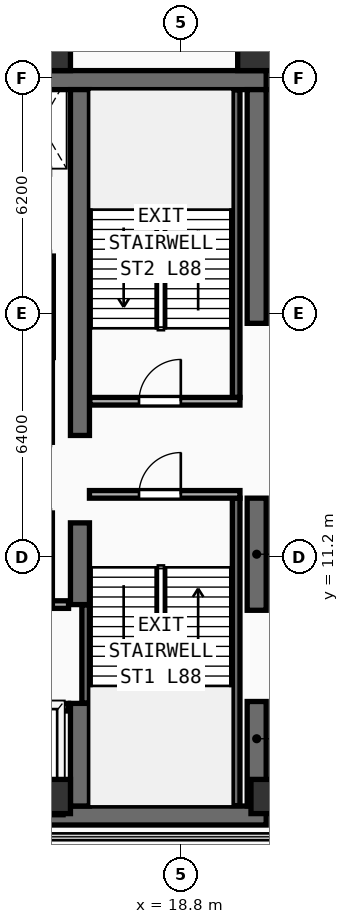
"""IFC4 building model, lengths in metres.
Left out: names, types, materials, properties, quantities, classifications, styles, units other than length and angle.
Written with IfcOpenShell. Run it as: python <this file> out.ifc"""

import sys

from ifc_helpers import new_model, si_unit, direction, frame, frame_2d, origin, origin_2d, place, context, subcontext, project, spatial, rectangle, extrude, element, fill, save


model = new_model("IFC4")
c1 = context("Model", 3, precision=1e-05, world=origin(), true_north=direction((0.0, 1.0)))
c2 = subcontext(c1, "Body", "Model", "MODEL_VIEW")
j1 = project(units=[si_unit("LENGTHUNIT", "METRE"), si_unit("PLANEANGLEUNIT", "RADIAN")], contexts=[c1])
p1 = place(None, origin())
s1 = spatial("IfcSite", under=j1, at=p1, CompositionType="ELEMENT")
p2 = place(p1, origin())
s2 = spatial("IfcBuilding", under=s1, at=p2, CompositionType="ELEMENT")
p3 = place(p2, frame((0.0, 0.0, 344.2)))
s3 = spatial("IfcBuildingStorey", under=s2, at=p3, CompositionType="ELEMENT", Elevation=344.2)
for number, where, z_axis, x_axis in (
    (1, (7.2, 4.4, 0.0), (0.0, 0.0, 1.0), (1.0, 0.0, 0.0)),
    (2, (7.2, 23.75, 0.0), (0.0, 0.0, 1.0), (1.0, 0.0, 0.0)),
):
    element("IfcWall", number, at=place(p3, frame(where, z_axis=z_axis, x_axis=x_axis)), inside=s3, PredefinedType="SHEAR", context=c2, shape_type="SweptSolid", body=[
        extrude(rectangle(XDim=13.85, YDim=0.5, at=frame_2d((6.925, 0.0))), origin(), (0.0, 0.0, 1.0), 3.66),
    ])
p4 = place(p3, frame((20.8, 4.65, 0.0), z_axis=(0.0, 0.0, 1.0), x_axis=(0.0, 1.0, 0.0)))
e3 = element("IfcWall", 3, at=p4, inside=s3, PredefinedType="SHEAR", context=c2, shape_type="SweptSolid", body=[
    extrude(rectangle(XDim=2.75, YDim=0.5, at=frame_2d((1.375, 0.0))), origin(), (0.0, 0.0, 1.0), 3.66),
])
p5 = place(p3, frame((20.8, 9.8, 0.0), z_axis=(0.0, 0.0, 1.0), x_axis=(0.0, 1.0, 0.0)))
e4 = element("IfcWall", 4, at=p5, inside=s3, PredefinedType="SHEAR", context=c2, shape_type="SweptSolid", body=[
    extrude(rectangle(XDim=2.95, YDim=0.5, at=frame_2d((1.475, 0.0))), origin(), (0.0, 0.0, 1.0), 3.66),
])
p6 = place(p3, frame((20.8, 17.35, 0.0), z_axis=(0.0, 0.0, 1.0), x_axis=(0.0, 1.0, 0.0)))
e5 = element("IfcWall", 5, at=p6, inside=s3, PredefinedType="SHEAR", context=c2, shape_type="SweptSolid", body=[
    extrude(rectangle(XDim=6.15, YDim=0.5, at=frame_2d((3.075, 0.0))), origin(), (0.0, 0.0, 1.0), 3.66),
])
p7 = place(p3, frame((16.15, 4.65, 0.0), z_axis=(0.0, 0.0, 1.0), x_axis=(0.0, 1.0, 0.0)))
e6 = element("IfcWall", 6, at=p7, inside=s3, PredefinedType="SHEAR", context=c2, shape_type="SweptSolid", body=[
    extrude(rectangle(XDim=2.7, YDim=0.5, at=frame_2d((1.35, 0.0))), origin(), (0.0, 0.0, 1.0), 3.66),
])
p8 = place(p3, frame((16.15, 9.95, 0.0), z_axis=(0.0, 0.0, 1.0), x_axis=(0.0, 1.0, 0.0)))
e7 = element("IfcWall", 7, at=p8, inside=s3, PredefinedType="SHEAR", context=c2, shape_type="SweptSolid", body=[
    extrude(rectangle(XDim=2.15, YDim=0.5, at=frame_2d((1.075, 0.0))), origin(), (0.0, 0.0, 1.0), 3.66),
])
p9 = place(p3, frame((16.15, 14.4, 0.0), z_axis=(0.0, 0.0, 1.0), x_axis=(0.0, 1.0, 0.0)))
e8 = element("IfcWall", 8, at=p9, inside=s3, PredefinedType="SHEAR", context=c2, shape_type="SweptSolid", body=[
    extrude(rectangle(XDim=9.1, YDim=0.5, at=frame_2d((4.55, 0.0))), origin(), (0.0, 0.0, 1.0), 3.66),
])
for number, where, z_axis, x_axis in (
    (9, (15.45, 4.9, 0.0), (0.0, 0.0, 1.0), (1.0, 0.0, 0.0)),
    (10, (21.1, 4.9, 0.0), (0.0, 0.0, 1.0), (1.0, 0.0, 0.0)),
    (11, (15.45, 24.45, 0.0), (0.0, 0.0, 1.0), (1.0, 0.0, 0.0)),
    (12, (20.75, 24.45, 0.0), (0.0, 0.0, 1.0), (1.0, 0.0, 0.0)),
):
    element("IfcColumn", number, at=place(p3, frame(where, z_axis=z_axis, x_axis=x_axis)), inside=s3, PredefinedType="COLUMN", context=c2, shape_type="SweptSolid", body=[
        extrude(rectangle(XDim=0.9, YDim=0.9, at=origin_2d()), origin(), (0.0, 0.0, 1.0), 3.66),
    ])
p10 = place(p3, frame((27.685, 19.175, 0.0), z_axis=(0.0, 0.0, 1.0), x_axis=(-0.707106781187, 0.707106781187, 0.0)))
e13 = element("IfcWall", 13, at=p10, inside=s3, PredefinedType="SOLIDWALL", context=c2, shape_type="SweptSolid", body=[
    extrude(rectangle(XDim=9.207, YDim=0.28, at=frame_2d((4.603, 0.0))), origin(), (0.0, 0.0, 1.0), 3.66),
])
p11 = place(p3, frame((16.3, 7.36, 0.0), z_axis=(0.0, 0.0, 1.0), x_axis=(0.0, 1.0, 0.0)))
e14 = element("IfcWall", 14, at=p11, inside=s3, PredefinedType="SHEAR", context=c2, shape_type="SweptSolid", body=[
    extrude(rectangle(XDim=2.58, YDim=0.2, at=frame_2d((1.29, 0.0))), origin(), (0.0, 0.0, 1.0), 3.66),
])
p12 = place(p3, frame((20.26, 4.66, 0.0), z_axis=(0.0, 0.0, 1.0), x_axis=(0.0, 1.0, 0.0)))
e15 = element("IfcWall", 15, at=p12, inside=s3, PredefinedType="SHEAR", context=c2, shape_type="SweptSolid", body=[
    extrude(rectangle(XDim=8.09, YDim=0.2, at=frame_2d((4.045, 0.0))), origin(), (0.0, 0.0, 1.0), 3.66),
])
p13 = place(p3, frame((16.4, 12.85, 0.0), z_axis=(0.0, 0.0, 1.0), x_axis=(1.0, 0.0, 0.0)))
e16 = element("IfcWall", 16, at=p13, inside=s3, PredefinedType="PARTITIONING", context=c2, shape_type="SweptSolid", body=[
    extrude(rectangle(XDim=3.96, YDim=0.2, at=frame_2d((1.98, 0.0))), origin(), (0.0, 0.0, 1.0), 3.66),
])
p14 = place(p13, frame((1.304, 0.0, 0.0)))
e17 = element("IfcOpeningElement", 17, at=p14, cuts=e16, PredefinedType="OPENING", context=c2, shape_type="SweptSolid", body=[
    extrude(rectangle(XDim=1.1, YDim=2.2, at=frame_2d((0.55, 1.1))), frame((0.0, 0.11, 0.0), z_axis=(0.0, -1.0, 0.0), x_axis=(1.0, 0.0, 0.0)), (0.0, 0.0, 1.0), 0.22),
])
p15 = place(p3, frame((20.26, 15.4, 0.0), z_axis=(0.0, 0.0, 1.0), x_axis=(0.0, 1.0, 0.0)))
e18 = element("IfcWall", 18, at=p15, inside=s3, PredefinedType="SHEAR", context=c2, shape_type="SweptSolid", body=[
    extrude(rectangle(XDim=8.09, YDim=0.2, at=frame_2d((4.045, 0.0))), origin(), (0.0, 0.0, 1.0), 3.66),
])
p16 = place(p3, frame((16.41, 15.3, 0.0), z_axis=(0.0, 0.0, 1.0), x_axis=(1.0, 0.0, 0.0)))
e19 = element("IfcWall", 19, at=p16, inside=s3, PredefinedType="PARTITIONING", context=c2, shape_type="SweptSolid", body=[
    extrude(rectangle(XDim=3.95, YDim=0.2, at=frame_2d((1.975, 0.0))), origin(), (0.0, 0.0, 1.0), 3.66),
])
p17 = place(p16, frame((1.294, 0.0, 0.0)))
e20 = element("IfcOpeningElement", 20, at=p17, cuts=e19, PredefinedType="OPENING", context=c2, shape_type="SweptSolid", body=[
    extrude(rectangle(XDim=1.1, YDim=2.2, at=frame_2d((0.55, 1.1))), frame((0.0, 0.11, 0.0), z_axis=(0.0, -1.0, 0.0), x_axis=(1.0, 0.0, 0.0)), (0.0, 0.0, 1.0), 0.22),
])
p18 = place(p3, frame((7.5, 7.25, 0.0), z_axis=(0.0, 0.0, 1.0), x_axis=(1.0, 0.0, 0.0)))
e21 = element("IfcWall", 21, at=p18, inside=s3, PredefinedType="PARTITIONING", context=c2, shape_type="SweptSolid", body=[
    extrude(rectangle(XDim=8.35, YDim=0.2, at=frame_2d((4.175, 0.0))), origin(), (0.0, 0.0, 1.0), 3.66),
])
p19 = place(p18, frame((0.53, 0.0, 0.0)))
e22 = element("IfcOpeningElement", 22, at=p19, cuts=e21, PredefinedType="OPENING", context=c2, shape_type="SweptSolid", body=[
    extrude(rectangle(XDim=1.1, YDim=2.2, at=frame_2d((0.55, 1.1))), frame((0.0, 0.11, 0.0), z_axis=(0.0, -1.0, 0.0), x_axis=(1.0, 0.0, 0.0)), (0.0, 0.0, 1.0), 0.22),
])
p20 = place(p18, frame((2.37, 0.0, 0.0)))
e23 = element("IfcOpeningElement", 23, at=p20, cuts=e21, PredefinedType="OPENING", context=c2, shape_type="SweptSolid", body=[
    extrude(rectangle(XDim=1.1, YDim=2.2, at=frame_2d((0.55, 1.1))), frame((0.0, 0.11, 0.0), z_axis=(0.0, -1.0, 0.0), x_axis=(1.0, 0.0, 0.0)), (0.0, 0.0, 1.0), 0.22),
])
p21 = place(p18, frame((4.33, 0.0, 0.0)))
e24 = element("IfcOpeningElement", 24, at=p21, cuts=e21, PredefinedType="OPENING", context=c2, shape_type="SweptSolid", body=[
    extrude(rectangle(XDim=1.1, YDim=2.2, at=frame_2d((0.55, 1.1))), frame((0.0, 0.11, 0.0), z_axis=(0.0, -1.0, 0.0), x_axis=(1.0, 0.0, 0.0)), (0.0, 0.0, 1.0), 0.22),
])
p22 = place(p18, frame((6.5, 0.0, 0.0)))
e25 = element("IfcOpeningElement", 25, at=p22, cuts=e21, PredefinedType="OPENING", context=c2, shape_type="SweptSolid", body=[
    extrude(rectangle(XDim=1.1, YDim=2.2, at=frame_2d((0.55, 1.1))), frame((0.0, 0.11, 0.0), z_axis=(0.0, -1.0, 0.0), x_axis=(1.0, 0.0, 0.0)), (0.0, 0.0, 1.0), 0.22),
])
p23 = place(p3, frame((7.5, 9.95, 0.0), z_axis=(0.0, 0.0, 1.0), x_axis=(1.0, 0.0, 0.0)))
e26 = element("IfcWall", 26, at=p23, inside=s3, PredefinedType="PARTITIONING", context=c2, shape_type="SweptSolid", body=[
    extrude(rectangle(XDim=8.35, YDim=0.2, at=frame_2d((4.175, 0.0))), origin(), (0.0, 0.0, 1.0), 3.66),
])
p24 = place(p3, frame((15.35, 9.95, 0.0), z_axis=(0.0, 0.0, 1.0), x_axis=(0.0, 1.0, 0.0)))
e27 = element("IfcWall", 27, at=p24, inside=s3, PredefinedType="PARTITIONING", context=c2, shape_type="SweptSolid", body=[
    extrude(rectangle(XDim=2.41, YDim=0.15, at=frame_2d((1.205, 0.0))), origin(), (0.0, 0.0, 1.0), 3.66),
])
p25 = place(p3, frame((15.35, 14.22, 0.0), z_axis=(0.0, 0.0, 1.0), x_axis=(0.0, 1.0, 0.0)))
e28 = element("IfcWall", 28, at=p25, inside=s3, PredefinedType="PARTITIONING", context=c2, shape_type="SweptSolid", body=[
    extrude(rectangle(XDim=2.23, YDim=0.15, at=frame_2d((1.115, 0.0))), origin(), (0.0, 0.0, 1.0), 3.66),
])
p26 = place(p3, frame((15.35, 16.45, 0.0), z_axis=(0.0, 0.0, 1.0), x_axis=(0.0, 1.0, 0.0)))
e29 = element("IfcWall", 29, at=p26, inside=s3, PredefinedType="PARTITIONING", context=c2, shape_type="SweptSolid", body=[
    extrude(rectangle(XDim=2.67, YDim=0.2, at=frame_2d((1.335, 0.0))), origin(), (0.0, 0.0, 1.0), 3.66),
])
p27 = place(p14, frame((1.1, 0.0, 0.0), z_axis=(0.0, 0.0, 1.0), x_axis=(-1.0, 0.0, 0.0)))
e30 = element("IfcDoor", 30, at=p27, inside=s3, OperationType="SINGLE_SWING_LEFT", PredefinedType="DOOR", context=c2, shape_type="SweptSolid", body=[
    extrude(rectangle(XDim=1.1, YDim=2.2, at=frame_2d((0.55, 1.1))), frame((0.0, 0.025, 0.0), z_axis=(0.0, -1.0, 0.0), x_axis=(1.0, 0.0, 0.0)), (0.0, 0.0, 1.0), 0.05),
])
fill(e17, e30)
p28 = place(p17, origin())
e31 = element("IfcDoor", 31, at=p28, inside=s3, OperationType="SINGLE_SWING_RIGHT", PredefinedType="DOOR", context=c2, shape_type="SweptSolid", body=[
    extrude(rectangle(XDim=1.1, YDim=2.2, at=frame_2d((0.55, 1.1))), frame((0.0, 0.025, 0.0), z_axis=(0.0, -1.0, 0.0), x_axis=(1.0, 0.0, 0.0)), (0.0, 0.0, 1.0), 0.05),
])
fill(e20, e31)
save(model, sys.argv[1])
